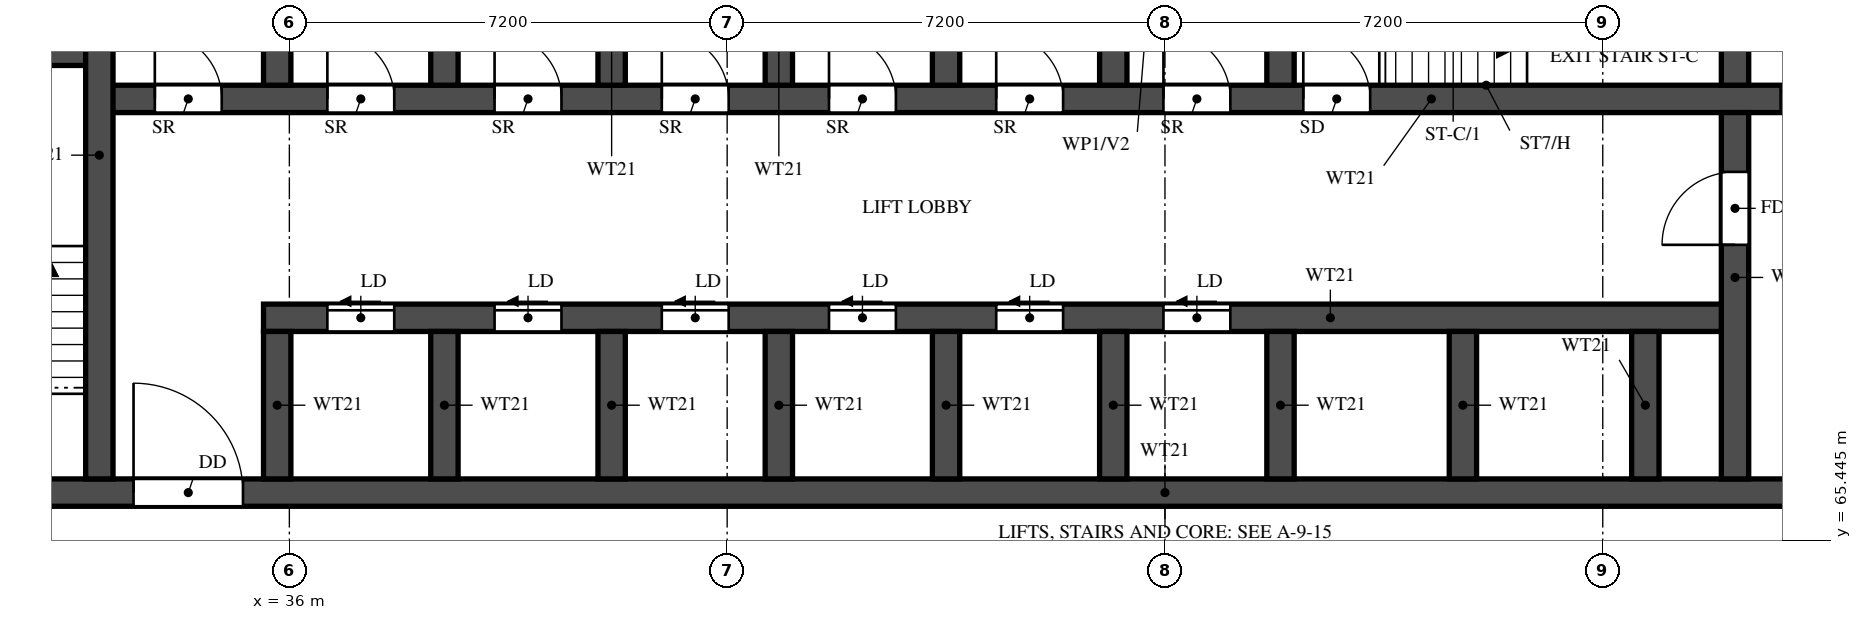
"""IFC4 building model, lengths in metres.
Left out: names, types, materials, properties, quantities, classifications, styles, units other than length and angle.
Written with IfcOpenShell. Run it as: python <this file> out.ifc"""

import sys

from ifc_helpers import new_model, si_unit, direction, frame, frame_2d, origin, place, context, subcontext, project, spatial, rectangle, extrude, element, fill, save


model = new_model("IFC4")
c1 = context("Model", 3, precision=1e-05, world=origin(), true_north=direction((0.0, 1.0)))
c2 = subcontext(c1, "Body", "Model", "MODEL_VIEW")
j1 = project(units=[si_unit("LENGTHUNIT", "METRE"), si_unit("PLANEANGLEUNIT", "RADIAN")], contexts=[c1])
p1 = place(None, origin())
s1 = spatial("IfcSite", under=j1, at=p1, CompositionType="ELEMENT")
p2 = place(p1, origin())
s2 = spatial("IfcBuilding", under=s1, at=p2, CompositionType="ELEMENT")
p3 = place(p2, frame((0.0, 0.0, 100.5)))
s3 = spatial("IfcBuildingStorey", under=s2, at=p3, CompositionType="ELEMENT", Elevation=100.5)
p4 = place(p3, frame((29.7, 66.225, 0.0), z_axis=(0.0, 0.0, 1.0), x_axis=(1.0, 0.0, 0.0)))
e1 = element("IfcWall", 1, at=p4, inside=s3, PredefinedType="SHEAR", context=c2, shape_type="SweptSolid", body=[
    extrude(rectangle(XDim=41.4, YDim=0.45, at=frame_2d((20.7, 0.0))), origin(), (0.0, 0.0, 1.0), 3.18),
])
p5 = place(p4, frame((0.925, 0.0, 0.0)))
e2 = element("IfcOpeningElement", 2, at=p5, cuts=e1, PredefinedType="OPENING", context=c2, shape_type="SweptSolid", body=[
    extrude(rectangle(XDim=1.1, YDim=2.1, at=frame_2d((0.55, 1.05))), frame((0.0, 0.235, 0.0), z_axis=(0.0, -1.0, 0.0), x_axis=(1.0, 0.0, 0.0)), (0.0, 0.0, 1.0), 0.47),
])
p6 = place(p4, frame((3.738, 0.0, 0.0)))
e3 = element("IfcOpeningElement", 3, at=p6, cuts=e1, PredefinedType="OPENING", context=c2, shape_type="SweptSolid", body=[
    extrude(rectangle(XDim=1.8, YDim=2.1, at=frame_2d((0.9, 1.05))), frame((0.0, 0.235, 0.0), z_axis=(0.0, -1.0, 0.0), x_axis=(1.0, 0.0, 0.0)), (0.0, 0.0, 1.0), 0.47),
])
p7 = place(p3, frame((35.575, 69.1, 0.0), z_axis=(0.0, 0.0, 1.0), x_axis=(1.0, 0.0, 0.0)))
e4 = element("IfcWall", 4, at=p7, inside=s3, PredefinedType="SHEAR", context=c2, shape_type="SweptSolid", body=[
    extrude(rectangle(XDim=24.2, YDim=0.45, at=frame_2d((12.1, 0.0))), origin(), (0.0, 0.0, 1.0), 3.18),
])
p8 = place(p7, frame((1.05, 0.0, 0.0)))
e5 = element("IfcOpeningElement", 5, at=p8, cuts=e4, PredefinedType="OPENING", context=c2, shape_type="SweptSolid", body=[
    extrude(rectangle(XDim=1.1, YDim=2.1, at=frame_2d((0.55, 1.05))), frame((0.0, 0.235, 0.0), z_axis=(0.0, -1.0, 0.0), x_axis=(1.0, 0.0, 0.0)), (0.0, 0.0, 1.0), 0.47),
])
p9 = place(p7, frame((3.8, 0.0, 0.0)))
e6 = element("IfcOpeningElement", 6, at=p9, cuts=e4, PredefinedType="OPENING", context=c2, shape_type="SweptSolid", body=[
    extrude(rectangle(XDim=1.1, YDim=2.1, at=frame_2d((0.55, 1.05))), frame((0.0, 0.235, 0.0), z_axis=(0.0, -1.0, 0.0), x_axis=(1.0, 0.0, 0.0)), (0.0, 0.0, 1.0), 0.47),
])
p10 = place(p7, frame((6.55, 0.0, 0.0)))
e7 = element("IfcOpeningElement", 7, at=p10, cuts=e4, PredefinedType="OPENING", context=c2, shape_type="SweptSolid", body=[
    extrude(rectangle(XDim=1.1, YDim=2.1, at=frame_2d((0.55, 1.05))), frame((0.0, 0.235, 0.0), z_axis=(0.0, -1.0, 0.0), x_axis=(1.0, 0.0, 0.0)), (0.0, 0.0, 1.0), 0.47),
])
p11 = place(p7, frame((9.3, 0.0, 0.0)))
e8 = element("IfcOpeningElement", 8, at=p11, cuts=e4, PredefinedType="OPENING", context=c2, shape_type="SweptSolid", body=[
    extrude(rectangle(XDim=1.1, YDim=2.1, at=frame_2d((0.55, 1.05))), frame((0.0, 0.235, 0.0), z_axis=(0.0, -1.0, 0.0), x_axis=(1.0, 0.0, 0.0)), (0.0, 0.0, 1.0), 0.47),
])
p12 = place(p7, frame((12.05, 0.0, 0.0)))
e9 = element("IfcOpeningElement", 9, at=p12, cuts=e4, PredefinedType="OPENING", context=c2, shape_type="SweptSolid", body=[
    extrude(rectangle(XDim=1.1, YDim=2.1, at=frame_2d((0.55, 1.05))), frame((0.0, 0.235, 0.0), z_axis=(0.0, -1.0, 0.0), x_axis=(1.0, 0.0, 0.0)), (0.0, 0.0, 1.0), 0.47),
])
p13 = place(p7, frame((14.8, 0.0, 0.0)))
e10 = element("IfcOpeningElement", 10, at=p13, cuts=e4, PredefinedType="OPENING", context=c2, shape_type="SweptSolid", body=[
    extrude(rectangle(XDim=1.1, YDim=2.1, at=frame_2d((0.55, 1.05))), frame((0.0, 0.235, 0.0), z_axis=(0.0, -1.0, 0.0), x_axis=(1.0, 0.0, 0.0)), (0.0, 0.0, 1.0), 0.47),
])
p14 = place(p3, frame((32.875, 72.7, 0.0), z_axis=(0.0, 0.0, 1.0), x_axis=(1.0, 0.0, 0.0)))
e11 = element("IfcWall", 11, at=p14, inside=s3, PredefinedType="SHEAR", context=c2, shape_type="SweptSolid", body=[
    extrude(rectangle(XDim=35.05, YDim=0.45, at=frame_2d((17.525, 0.0))), origin(), (0.0, 0.0, 1.0), 3.18),
])
p15 = place(p14, frame((19.8, 0.0, 0.0)))
e12 = element("IfcOpeningElement", 12, at=p15, cuts=e11, PredefinedType="OPENING", context=c2, shape_type="SweptSolid", body=[
    extrude(rectangle(XDim=1.1, YDim=2.1, at=frame_2d((0.55, 1.05))), frame((0.0, 0.235, 0.0), z_axis=(0.0, -1.0, 0.0), x_axis=(1.0, 0.0, 0.0)), (0.0, 0.0, 1.0), 0.47),
])
p16 = place(p14, frame((27.65, 0.0, 0.0)))
e13 = element("IfcOpeningElement", 13, at=p16, cuts=e11, PredefinedType="OPENING", context=c2, shape_type="SweptSolid", body=[
    extrude(rectangle(XDim=1.1, YDim=2.1, at=frame_2d((0.55, 1.05))), frame((0.0, 0.235, 0.0), z_axis=(0.0, -1.0, 0.0), x_axis=(1.0, 0.0, 0.0)), (0.0, 0.0, 1.0), 0.47),
])
p17 = place(p14, frame((30.25, 0.0, 0.0)))
e14 = element("IfcOpeningElement", 14, at=p17, cuts=e11, PredefinedType="OPENING", context=c2, shape_type="SweptSolid", body=[
    extrude(rectangle(XDim=1.1, YDim=2.1, at=frame_2d((0.55, 1.05))), frame((0.0, 0.235, 0.0), z_axis=(0.0, -1.0, 0.0), x_axis=(1.0, 0.0, 0.0)), (0.0, 0.0, 1.0), 0.47),
])
p18 = place(p14, frame((3.75, 0.0, 0.0)))
e15 = element("IfcOpeningElement", 15, at=p18, cuts=e11, PredefinedType="OPENING", context=c2, shape_type="SweptSolid", body=[
    extrude(rectangle(XDim=1.1, YDim=2.1, at=frame_2d((0.55, 1.05))), frame((0.0, 0.235, 0.0), z_axis=(0.0, -1.0, 0.0), x_axis=(1.0, 0.0, 0.0)), (0.0, 0.0, 1.0), 0.47),
])
p19 = place(p14, frame((6.5, 0.0, 0.0)))
e16 = element("IfcOpeningElement", 16, at=p19, cuts=e11, PredefinedType="OPENING", context=c2, shape_type="SweptSolid", body=[
    extrude(rectangle(XDim=1.1, YDim=2.1, at=frame_2d((0.55, 1.05))), frame((0.0, 0.235, 0.0), z_axis=(0.0, -1.0, 0.0), x_axis=(1.0, 0.0, 0.0)), (0.0, 0.0, 1.0), 0.47),
])
p20 = place(p14, frame((9.25, 0.0, 0.0)))
e17 = element("IfcOpeningElement", 17, at=p20, cuts=e11, PredefinedType="OPENING", context=c2, shape_type="SweptSolid", body=[
    extrude(rectangle(XDim=1.1, YDim=2.1, at=frame_2d((0.55, 1.05))), frame((0.0, 0.235, 0.0), z_axis=(0.0, -1.0, 0.0), x_axis=(1.0, 0.0, 0.0)), (0.0, 0.0, 1.0), 0.47),
])
p21 = place(p14, frame((12.0, 0.0, 0.0)))
e18 = element("IfcOpeningElement", 18, at=p21, cuts=e11, PredefinedType="OPENING", context=c2, shape_type="SweptSolid", body=[
    extrude(rectangle(XDim=1.1, YDim=2.1, at=frame_2d((0.55, 1.05))), frame((0.0, 0.235, 0.0), z_axis=(0.0, -1.0, 0.0), x_axis=(1.0, 0.0, 0.0)), (0.0, 0.0, 1.0), 0.47),
])
p22 = place(p14, frame((14.75, 0.0, 0.0)))
e19 = element("IfcOpeningElement", 19, at=p22, cuts=e11, PredefinedType="OPENING", context=c2, shape_type="SweptSolid", body=[
    extrude(rectangle(XDim=1.1, YDim=2.1, at=frame_2d((0.55, 1.05))), frame((0.0, 0.235, 0.0), z_axis=(0.0, -1.0, 0.0), x_axis=(1.0, 0.0, 0.0)), (0.0, 0.0, 1.0), 0.47),
])
p23 = place(p14, frame((17.5, 0.0, 0.0)))
e20 = element("IfcOpeningElement", 20, at=p23, cuts=e11, PredefinedType="OPENING", context=c2, shape_type="SweptSolid", body=[
    extrude(rectangle(XDim=1.1, YDim=2.1, at=frame_2d((0.55, 1.05))), frame((0.0, 0.235, 0.0), z_axis=(0.0, -1.0, 0.0), x_axis=(1.0, 0.0, 0.0)), (0.0, 0.0, 1.0), 0.47),
])
p24 = place(p14, frame((0.913, 0.0, 0.0)))
e21 = element("IfcOpeningElement", 21, at=p24, cuts=e11, PredefinedType="OPENING", context=c2, shape_type="SweptSolid", body=[
    extrude(rectangle(XDim=1.1, YDim=2.1, at=frame_2d((0.55, 1.05))), frame((0.0, 0.235, 0.0), z_axis=(0.0, -1.0, 0.0), x_axis=(1.0, 0.0, 0.0)), (0.0, 0.0, 1.0), 0.47),
])
p25 = place(p3, frame((29.7, 73.475, 0.0), z_axis=(0.0, 0.0, 1.0), x_axis=(1.0, 0.0, 0.0)))
e22 = element("IfcWall", 22, at=p25, inside=s3, PredefinedType="SHEAR", context=c2, shape_type="SweptSolid", body=[
    extrude(rectangle(XDim=3.175, YDim=0.45, at=frame_2d((1.587, 0.0))), origin(), (0.0, 0.0, 1.0), 3.18),
])
p26 = place(p3, frame((32.875, 66.45, 0.0), z_axis=(0.0, 0.0, 1.0), x_axis=(0.0, 1.0, 0.0)))
e23 = element("IfcWall", 23, at=p26, inside=s3, PredefinedType="SHEAR", context=c2, shape_type="SweptSolid", body=[
    extrude(rectangle(XDim=10.65, YDim=0.45, at=frame_2d((5.325, 0.0))), origin(), (0.0, 0.0, 1.0), 3.18),
])
p27 = place(p3, frame((59.775, 66.45, 0.0), z_axis=(0.0, 0.0, 1.0), x_axis=(0.0, 1.0, 0.0)))
e24 = element("IfcWall", 24, at=p27, inside=s3, PredefinedType="SHEAR", context=c2, shape_type="SweptSolid", body=[
    extrude(rectangle(XDim=6.025, YDim=0.45, at=frame_2d((3.013, 0.0))), origin(), (0.0, 0.0, 1.0), 3.18),
])
p28 = place(p27, frame((3.85, 0.0, 0.0)))
e25 = element("IfcOpeningElement", 25, at=p28, cuts=e24, PredefinedType="OPENING", context=c2, shape_type="SweptSolid", body=[
    extrude(rectangle(XDim=1.2, YDim=2.1, at=frame_2d((0.6, 1.05))), frame((0.0, 0.235, 0.0), z_axis=(0.0, -1.0, 0.0), x_axis=(1.0, 0.0, 0.0)), (0.0, 0.0, 1.0), 0.47),
])
p29 = place(p3, frame((59.775, 72.925, 0.0), z_axis=(0.0, 0.0, 1.0), x_axis=(0.0, 1.0, 0.0)))
e26 = element("IfcWall", 26, at=p29, inside=s3, PredefinedType="SHEAR", context=c2, shape_type="SweptSolid", body=[
    extrude(rectangle(XDim=2.95, YDim=0.45, at=frame_2d((1.475, 0.0))), origin(), (0.0, 0.0, 1.0), 3.18),
])
for number, where, z_axis, x_axis in (
    (27, (35.8, 66.45, 0.0), (0.0, 0.0, 1.0), (0.0, 1.0, 0.0)),
    (28, (38.55, 66.45, 0.0), (0.0, 0.0, 1.0), (0.0, 1.0, 0.0)),
    (29, (41.3, 66.45, 0.0), (0.0, 0.0, 1.0), (0.0, 1.0, 0.0)),
    (30, (44.05, 66.45, 0.0), (0.0, 0.0, 1.0), (0.0, 1.0, 0.0)),
    (31, (46.8, 66.45, 0.0), (0.0, 0.0, 1.0), (0.0, 1.0, 0.0)),
    (32, (49.55, 66.45, 0.0), (0.0, 0.0, 1.0), (0.0, 1.0, 0.0)),
    (33, (52.3, 66.45, 0.0), (0.0, 0.0, 1.0), (0.0, 1.0, 0.0)),
    (34, (55.3, 66.45, 0.0), (0.0, 0.0, 1.0), (0.0, 1.0, 0.0)),
    (35, (58.3, 66.45, 0.0), (0.0, 0.0, 1.0), (0.0, 1.0, 0.0)),
):
    element("IfcWall", number, at=place(p3, frame(where, z_axis=z_axis, x_axis=x_axis)), inside=s3, PredefinedType="SHEAR", context=c2, shape_type="SweptSolid", body=[
        extrude(rectangle(XDim=2.425, YDim=0.45, at=frame_2d((1.212, 0.0))), origin(), (0.0, 0.0, 1.0), 3.18),
    ])
for number, where, z_axis, x_axis in (
    (36, (35.8, 72.925, 0.0), (0.0, 0.0, 1.0), (0.0, 1.0, 0.0)),
    (37, (38.55, 72.925, 0.0), (0.0, 0.0, 1.0), (0.0, 1.0, 0.0)),
    (38, (41.3, 72.925, 0.0), (0.0, 0.0, 1.0), (0.0, 1.0, 0.0)),
    (39, (44.05, 72.925, 0.0), (0.0, 0.0, 1.0), (0.0, 1.0, 0.0)),
    (40, (46.8, 72.925, 0.0), (0.0, 0.0, 1.0), (0.0, 1.0, 0.0)),
    (41, (49.55, 72.925, 0.0), (0.0, 0.0, 1.0), (0.0, 1.0, 0.0)),
    (42, (52.3, 72.925, 0.0), (0.0, 0.0, 1.0), (0.0, 1.0, 0.0)),
):
    element("IfcWall", number, at=place(p3, frame(where, z_axis=z_axis, x_axis=x_axis)), inside=s3, PredefinedType="SHEAR", context=c2, shape_type="SweptSolid", body=[
        extrude(rectangle(XDim=2.95, YDim=0.45, at=frame_2d((1.475, 0.0))), origin(), (0.0, 0.0, 1.0), 3.18),
    ])
p30 = place(p15, origin())
e43 = element("IfcDoor", 43, at=p30, inside=s3, OperationType="SINGLE_SWING_LEFT", PredefinedType="DOOR", context=c2, shape_type="SweptSolid", body=[
    extrude(rectangle(XDim=1.1, YDim=2.1, at=frame_2d((0.55, 1.05))), frame((0.0, 0.025, 0.0), z_axis=(0.0, -1.0, 0.0), x_axis=(1.0, 0.0, 0.0)), (0.0, 0.0, 1.0), 0.05),
])
fill(e12, e43)
p31 = place(p6, origin())
e44 = element("IfcDoor", 44, at=p31, inside=s3, OperationType="DOUBLE_DOOR_SINGLE_SWING", PredefinedType="DOOR", context=c2, shape_type="SweptSolid", body=[
    extrude(rectangle(XDim=1.8, YDim=2.1, at=frame_2d((0.9, 1.05))), frame((0.0, 0.025, 0.0), z_axis=(0.0, -1.0, 0.0), x_axis=(1.0, 0.0, 0.0)), (0.0, 0.0, 1.0), 0.05),
])
fill(e3, e44)
p32 = place(p28, origin())
e45 = element("IfcDoor", 45, at=p32, inside=s3, OperationType="SINGLE_SWING_RIGHT", PredefinedType="DOOR", context=c2, shape_type="SweptSolid", body=[
    extrude(rectangle(XDim=1.2, YDim=2.1, at=frame_2d((0.6, 1.05))), frame((0.0, 0.025, 0.0), z_axis=(0.0, -1.0, 0.0), x_axis=(1.0, 0.0, 0.0)), (0.0, 0.0, 1.0), 0.05),
])
fill(e25, e45)
p33 = place(p16, origin())
e46 = element("IfcDoor", 46, at=p33, inside=s3, OperationType="SLIDING_TO_LEFT", PredefinedType="DOOR", context=c2, shape_type="SweptSolid", body=[
    extrude(rectangle(XDim=1.1, YDim=2.1, at=frame_2d((0.55, 1.05))), frame((0.0, 0.025, 0.0), z_axis=(0.0, -1.0, 0.0), x_axis=(1.0, 0.0, 0.0)), (0.0, 0.0, 1.0), 0.05),
])
fill(e13, e46)
p34 = place(p8, origin())
e47 = element("IfcDoor", 47, at=p34, inside=s3, OperationType="SLIDING_TO_LEFT", PredefinedType="DOOR", context=c2, shape_type="SweptSolid", body=[
    extrude(rectangle(XDim=1.1, YDim=2.1, at=frame_2d((0.55, 1.05))), frame((0.0, 0.025, 0.0), z_axis=(0.0, -1.0, 0.0), x_axis=(1.0, 0.0, 0.0)), (0.0, 0.0, 1.0), 0.05),
])
fill(e5, e47)
p35 = place(p9, origin())
e48 = element("IfcDoor", 48, at=p35, inside=s3, OperationType="SLIDING_TO_LEFT", PredefinedType="DOOR", context=c2, shape_type="SweptSolid", body=[
    extrude(rectangle(XDim=1.1, YDim=2.1, at=frame_2d((0.55, 1.05))), frame((0.0, 0.025, 0.0), z_axis=(0.0, -1.0, 0.0), x_axis=(1.0, 0.0, 0.0)), (0.0, 0.0, 1.0), 0.05),
])
fill(e6, e48)
p36 = place(p10, origin())
e49 = element("IfcDoor", 49, at=p36, inside=s3, OperationType="SLIDING_TO_LEFT", PredefinedType="DOOR", context=c2, shape_type="SweptSolid", body=[
    extrude(rectangle(XDim=1.1, YDim=2.1, at=frame_2d((0.55, 1.05))), frame((0.0, 0.025, 0.0), z_axis=(0.0, -1.0, 0.0), x_axis=(1.0, 0.0, 0.0)), (0.0, 0.0, 1.0), 0.05),
])
fill(e7, e49)
p37 = place(p11, origin())
e50 = element("IfcDoor", 50, at=p37, inside=s3, OperationType="SLIDING_TO_LEFT", PredefinedType="DOOR", context=c2, shape_type="SweptSolid", body=[
    extrude(rectangle(XDim=1.1, YDim=2.1, at=frame_2d((0.55, 1.05))), frame((0.0, 0.025, 0.0), z_axis=(0.0, -1.0, 0.0), x_axis=(1.0, 0.0, 0.0)), (0.0, 0.0, 1.0), 0.05),
])
fill(e8, e50)
p38 = place(p12, origin())
e51 = element("IfcDoor", 51, at=p38, inside=s3, OperationType="SLIDING_TO_LEFT", PredefinedType="DOOR", context=c2, shape_type="SweptSolid", body=[
    extrude(rectangle(XDim=1.1, YDim=2.1, at=frame_2d((0.55, 1.05))), frame((0.0, 0.025, 0.0), z_axis=(0.0, -1.0, 0.0), x_axis=(1.0, 0.0, 0.0)), (0.0, 0.0, 1.0), 0.05),
])
fill(e9, e51)
p39 = place(p13, origin())
e52 = element("IfcDoor", 52, at=p39, inside=s3, OperationType="SLIDING_TO_LEFT", PredefinedType="DOOR", context=c2, shape_type="SweptSolid", body=[
    extrude(rectangle(XDim=1.1, YDim=2.1, at=frame_2d((0.55, 1.05))), frame((0.0, 0.025, 0.0), z_axis=(0.0, -1.0, 0.0), x_axis=(1.0, 0.0, 0.0)), (0.0, 0.0, 1.0), 0.05),
])
fill(e10, e52)
p40 = place(p18, origin())
e53 = element("IfcDoor", 53, at=p40, inside=s3, OperationType="SINGLE_SWING_LEFT", PredefinedType="DOOR", context=c2, shape_type="SweptSolid", body=[
    extrude(rectangle(XDim=1.1, YDim=2.1, at=frame_2d((0.55, 1.05))), frame((0.0, 0.025, 0.0), z_axis=(0.0, -1.0, 0.0), x_axis=(1.0, 0.0, 0.0)), (0.0, 0.0, 1.0), 0.05),
])
fill(e15, e53)
p41 = place(p19, origin())
e54 = element("IfcDoor", 54, at=p41, inside=s3, OperationType="SINGLE_SWING_LEFT", PredefinedType="DOOR", context=c2, shape_type="SweptSolid", body=[
    extrude(rectangle(XDim=1.1, YDim=2.1, at=frame_2d((0.55, 1.05))), frame((0.0, 0.025, 0.0), z_axis=(0.0, -1.0, 0.0), x_axis=(1.0, 0.0, 0.0)), (0.0, 0.0, 1.0), 0.05),
])
fill(e16, e54)
p42 = place(p20, origin())
e55 = element("IfcDoor", 55, at=p42, inside=s3, OperationType="SINGLE_SWING_LEFT", PredefinedType="DOOR", context=c2, shape_type="SweptSolid", body=[
    extrude(rectangle(XDim=1.1, YDim=2.1, at=frame_2d((0.55, 1.05))), frame((0.0, 0.025, 0.0), z_axis=(0.0, -1.0, 0.0), x_axis=(1.0, 0.0, 0.0)), (0.0, 0.0, 1.0), 0.05),
])
fill(e17, e55)
p43 = place(p21, origin())
e56 = element("IfcDoor", 56, at=p43, inside=s3, OperationType="SINGLE_SWING_LEFT", PredefinedType="DOOR", context=c2, shape_type="SweptSolid", body=[
    extrude(rectangle(XDim=1.1, YDim=2.1, at=frame_2d((0.55, 1.05))), frame((0.0, 0.025, 0.0), z_axis=(0.0, -1.0, 0.0), x_axis=(1.0, 0.0, 0.0)), (0.0, 0.0, 1.0), 0.05),
])
fill(e18, e56)
p44 = place(p22, origin())
e57 = element("IfcDoor", 57, at=p44, inside=s3, OperationType="SINGLE_SWING_LEFT", PredefinedType="DOOR", context=c2, shape_type="SweptSolid", body=[
    extrude(rectangle(XDim=1.1, YDim=2.1, at=frame_2d((0.55, 1.05))), frame((0.0, 0.025, 0.0), z_axis=(0.0, -1.0, 0.0), x_axis=(1.0, 0.0, 0.0)), (0.0, 0.0, 1.0), 0.05),
])
fill(e19, e57)
p45 = place(p23, origin())
e58 = element("IfcDoor", 58, at=p45, inside=s3, OperationType="SINGLE_SWING_LEFT", PredefinedType="DOOR", context=c2, shape_type="SweptSolid", body=[
    extrude(rectangle(XDim=1.1, YDim=2.1, at=frame_2d((0.55, 1.05))), frame((0.0, 0.025, 0.0), z_axis=(0.0, -1.0, 0.0), x_axis=(1.0, 0.0, 0.0)), (0.0, 0.0, 1.0), 0.05),
])
fill(e20, e58)
p46 = place(p24, origin())
e59 = element("IfcDoor", 59, at=p46, inside=s3, OperationType="SINGLE_SWING_LEFT", PredefinedType="DOOR", context=c2, shape_type="SweptSolid", body=[
    extrude(rectangle(XDim=1.1, YDim=2.1, at=frame_2d((0.55, 1.05))), frame((0.0, 0.025, 0.0), z_axis=(0.0, -1.0, 0.0), x_axis=(1.0, 0.0, 0.0)), (0.0, 0.0, 1.0), 0.05),
])
fill(e21, e59)
save(model, sys.argv[1])
